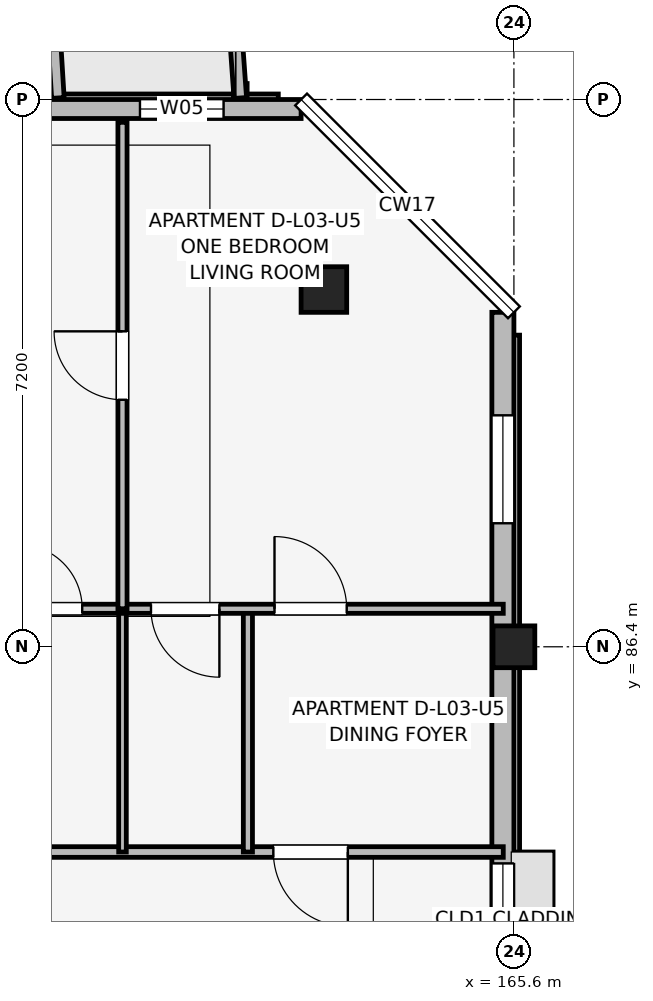
"""IFC4 building model, lengths in metres.
Left out: names, types, materials, properties, quantities, classifications, styles, units other than length and angle.
Written with IfcOpenShell. Run it as: python <this file> out.ifc"""

import sys

from ifc_helpers import new_model, si_unit, direction, frame, frame_2d, origin, origin_2d, place, context, subcontext, project, spatial, rectangle, extrude, element, fill, save


model = new_model("IFC4")
c1 = context("Model", 3, precision=1e-05, world=origin(), true_north=direction((0.0, 1.0)))
c2 = subcontext(c1, "Body", "Model", "MODEL_VIEW")
j1 = project(units=[si_unit("LENGTHUNIT", "METRE"), si_unit("PLANEANGLEUNIT", "RADIAN")], contexts=[c1])
p1 = place(None, origin())
s1 = spatial("IfcSite", under=j1, at=p1, CompositionType="ELEMENT")
p2 = place(p1, origin())
s2 = spatial("IfcBuilding", under=s1, at=p2, CompositionType="ELEMENT")
p3 = place(p2, frame((0.0, 0.0, 11.85)))
s3 = spatial("IfcBuildingStorey", under=s2, at=p3, CompositionType="ELEMENT", Elevation=11.85)
p4 = place(p3, frame((165.6, 86.4, 0.0), z_axis=(0.0, 0.0, 1.0), x_axis=(1.0, 0.0, 0.0)))
e1 = element("IfcColumn", 1, at=p4, inside=s3, PredefinedType="COLUMN", context=c2, shape_type="SweptSolid", body=[
    extrude(rectangle(XDim=0.55, YDim=0.55, at=origin_2d()), origin(), (0.0, 0.0, 1.0), 3.15),
])
p5 = place(p3, frame((163.1, 91.1, 0.0), z_axis=(0.0, 0.0, 1.0), x_axis=(1.0, 0.0, 0.0)))
e2 = element("IfcColumn", 2, at=p5, inside=s3, PredefinedType="COLUMN", context=c2, shape_type="SweptSolid", body=[
    extrude(rectangle(XDim=0.6, YDim=0.6, at=origin_2d()), origin(), (0.0, 0.0, 1.0), 3.15),
])
p6 = place(p3, frame((165.455, 74.8, 0.0), z_axis=(0.0, 0.0, 1.0), x_axis=(0.0, 1.0, 0.0)))
e3 = element("IfcWall", 3, at=p6, inside=s3, PredefinedType="SOLIDWALL", context=c2, shape_type="SweptSolid", body=[
    extrude(rectangle(XDim=16.0, YDim=0.29, at=frame_2d((8.0, 0.0))), origin(), (0.0, 0.0, 1.0), 2.38),
])
p7 = place(p6, frame((7.25, 0.0, 1.05)))
e4 = element("IfcOpeningElement", 4, at=p7, cuts=e3, PredefinedType="OPENING", context=c2, shape_type="SweptSolid", body=[
    extrude(rectangle(XDim=1.5, YDim=1.15, at=frame_2d((0.75, 0.575))), frame((0.0, 0.155, 0.0), z_axis=(0.0, -1.0, 0.0), x_axis=(1.0, 0.0, 0.0)), (0.0, 0.0, 1.0), 0.31),
])
p8 = place(p6, frame((13.225, 0.0, 0.67)))
e5 = element("IfcOpeningElement", 5, at=p8, cuts=e3, PredefinedType="OPENING", context=c2, shape_type="SweptSolid", body=[
    extrude(rectangle(XDim=1.42, YDim=1.6, at=frame_2d((0.71, 0.8))), frame((0.0, 0.155, 0.0), z_axis=(0.0, -1.0, 0.0), x_axis=(1.0, 0.0, 0.0)), (0.0, 0.0, 1.0), 0.31),
])
p9 = place(p3, frame((162.8, 93.475, 0.0), z_axis=(0.0, 0.0, 1.0), x_axis=(-1.0, 0.0, 0.0)))
e6 = element("IfcWall", 6, at=p9, inside=s3, PredefinedType="SOLIDWALL", context=c2, shape_type="SweptSolid", body=[
    extrude(rectangle(XDim=30.4, YDim=0.25, at=frame_2d((15.2, 0.0))), origin(), (0.0, 0.0, 1.0), 2.43),
])
p10 = place(p9, frame((22.1, 0.0, 0.0), z_axis=(0.0, 0.0, 1.0), x_axis=(-1.0, 0.0, 0.0)))
e7 = element("IfcOpeningElement", 7, at=p10, cuts=e6, PredefinedType="OPENING", context=c2, shape_type="SweptSolid", body=[
    extrude(rectangle(XDim=1.8, YDim=2.15, at=frame_2d((0.9, 1.075))), frame((0.0, 0.135, 0.0), z_axis=(0.0, -1.0, 0.0), x_axis=(1.0, 0.0, 0.0)), (0.0, 0.0, 1.0), 0.27),
])
p11 = place(p9, frame((7.625, 0.0, 0.0), z_axis=(0.0, 0.0, 1.0), x_axis=(-1.0, 0.0, 0.0)))
e8 = element("IfcOpeningElement", 8, at=p11, cuts=e6, PredefinedType="OPENING", context=c2, shape_type="SweptSolid", body=[
    extrude(rectangle(XDim=1.65, YDim=2.15, at=frame_2d((0.825, 1.075))), frame((0.0, 0.135, 0.0), z_axis=(0.0, -1.0, 0.0), x_axis=(1.0, 0.0, 0.0)), (0.0, 0.0, 1.0), 0.27),
])
p12 = place(p9, frame((27.97, 0.0, 0.7)))
e9 = element("IfcOpeningElement", 9, at=p12, cuts=e6, PredefinedType="OPENING", context=c2, shape_type="SweptSolid", body=[
    extrude(rectangle(XDim=1.46, YDim=1.55, at=frame_2d((0.73, 0.775))), frame((0.0, 0.135, 0.0), z_axis=(0.0, -1.0, 0.0), x_axis=(1.0, 0.0, 0.0)), (0.0, 0.0, 1.0), 0.27),
])
p13 = place(p9, frame((26.458, 0.0, 0.75)))
e10 = element("IfcOpeningElement", 10, at=p13, cuts=e6, PredefinedType="OPENING", context=c2, shape_type="SweptSolid", body=[
    extrude(rectangle(XDim=0.6, YDim=1.25, at=frame_2d((0.3, 0.625))), frame((0.0, 0.135, 0.0), z_axis=(0.0, -1.0, 0.0), x_axis=(1.0, 0.0, 0.0)), (0.0, 0.0, 1.0), 0.27),
])
p14 = place(p9, frame((24.942, 0.0, 0.75)))
e11 = element("IfcOpeningElement", 11, at=p14, cuts=e6, PredefinedType="OPENING", context=c2, shape_type="SweptSolid", body=[
    extrude(rectangle(XDim=0.6, YDim=1.25, at=frame_2d((0.3, 0.625))), frame((0.0, 0.135, 0.0), z_axis=(0.0, -1.0, 0.0), x_axis=(1.0, 0.0, 0.0)), (0.0, 0.0, 1.0), 0.27),
])
p15 = place(p9, frame((15.54, 0.0, 0.7)))
e12 = element("IfcOpeningElement", 12, at=p15, cuts=e6, PredefinedType="OPENING", context=c2, shape_type="SweptSolid", body=[
    extrude(rectangle(XDim=1.72, YDim=1.6, at=frame_2d((0.86, 0.8))), frame((0.0, 0.135, 0.0), z_axis=(0.0, -1.0, 0.0), x_axis=(1.0, 0.0, 0.0)), (0.0, 0.0, 1.0), 0.27),
])
p16 = place(p9, frame((13.465, 0.0, 0.75)))
e13 = element("IfcOpeningElement", 13, at=p16, cuts=e6, PredefinedType="OPENING", context=c2, shape_type="SweptSolid", body=[
    extrude(rectangle(XDim=0.72, YDim=1.35, at=frame_2d((0.36, 0.675))), frame((0.0, 0.135, 0.0), z_axis=(0.0, -1.0, 0.0), x_axis=(1.0, 0.0, 0.0)), (0.0, 0.0, 1.0), 0.27),
])
p17 = place(p9, frame((10.542, 0.0, 0.75)))
e14 = element("IfcOpeningElement", 14, at=p17, cuts=e6, PredefinedType="OPENING", context=c2, shape_type="SweptSolid", body=[
    extrude(rectangle(XDim=0.6, YDim=1.25, at=frame_2d((0.3, 0.625))), frame((0.0, 0.135, 0.0), z_axis=(0.0, -1.0, 0.0), x_axis=(1.0, 0.0, 0.0)), (0.0, 0.0, 1.0), 0.27),
])
p18 = place(p9, frame((3.343, 0.0, 0.75)))
e15 = element("IfcOpeningElement", 15, at=p18, cuts=e6, PredefinedType="OPENING", context=c2, shape_type="SweptSolid", body=[
    extrude(rectangle(XDim=0.6, YDim=1.25, at=frame_2d((0.3, 0.625))), frame((0.0, 0.135, 0.0), z_axis=(0.0, -1.0, 0.0), x_axis=(1.0, 0.0, 0.0)), (0.0, 0.0, 1.0), 0.27),
])
p19 = place(p9, frame((1.02, 0.0, 0.75)))
e16 = element("IfcOpeningElement", 16, at=p19, cuts=e6, PredefinedType="OPENING", context=c2, shape_type="SweptSolid", body=[
    extrude(rectangle(XDim=1.1, YDim=1.5, at=frame_2d((0.55, 0.75))), frame((0.0, 0.135, 0.0), z_axis=(0.0, -1.0, 0.0), x_axis=(1.0, 0.0, 0.0)), (0.0, 0.0, 1.0), 0.27),
])
p20 = place(p3, frame((159.6, 93.62, 0.0), z_axis=(0.0, 0.0, 1.0), x_axis=(-0.061170732449, 0.998127317276, 0.0)))
e17 = element("IfcWall", 17, at=p20, inside=s3, PredefinedType="ELEMENTEDWALL", context=c2, shape_type="SweptSolid", body=[
    extrude(rectangle(XDim=1.964, YDim=0.165, at=frame_2d((0.982, 0.0))), origin(), (0.0, 0.0, 1.0), 2.95),
])
p21 = place(p3, frame((162.0, 93.62, 0.0), z_axis=(0.0, 0.0, 1.0), x_axis=(-0.071194071069, 0.997462482625, 0.0)))
e18 = element("IfcWall", 18, at=p21, inside=s3, PredefinedType="ELEMENTEDWALL", context=c2, shape_type="SweptSolid", body=[
    extrude(rectangle(XDim=1.965, YDim=0.165, at=frame_2d((0.982, 0.0))), origin(), (0.0, 0.0, 1.0), 2.95),
])
p22 = place(p3, frame((158.54, 83.7, 0.0), z_axis=(0.0, 0.0, 1.0), x_axis=(1.0, 0.0, 0.0)))
e19 = element("IfcWall", 19, at=p22, inside=s3, PredefinedType="PARTITIONING", context=c2, shape_type="SweptSolid", body=[
    extrude(rectangle(XDim=6.92, YDim=0.14, at=frame_2d((3.46, 0.0))), origin(), (0.0, 0.0, 1.0), 2.38),
])
p23 = place(p22, frame((4.875, 0.0, 0.0), z_axis=(0.0, 0.0, 1.0), x_axis=(-1.0, 0.0, 0.0)))
e20 = element("IfcOpeningElement", 20, at=p23, cuts=e19, PredefinedType="OPENING", context=c2, shape_type="SweptSolid", body=[
    extrude(rectangle(XDim=0.98, YDim=2.1, at=frame_2d((0.49, 1.05))), frame((0.0, 0.08, 0.0), z_axis=(0.0, -1.0, 0.0), x_axis=(1.0, 0.0, 0.0)), (0.0, 0.0, 1.0), 0.16),
])
p24 = place(p3, frame((160.45, 83.7, 0.0), z_axis=(0.0, 0.0, 1.0), x_axis=(0.0, 1.0, 0.0)))
e21 = element("IfcWall", 21, at=p24, inside=s3, PredefinedType="PARTITIONING", context=c2, shape_type="SweptSolid", body=[
    extrude(rectangle(XDim=3.2, YDim=0.1, at=frame_2d((1.6, 0.0))), origin(), (0.0, 0.0, 1.0), 2.375),
])
p25 = place(p3, frame((162.1, 83.7, 0.0), z_axis=(0.0, 0.0, 1.0), x_axis=(0.0, 1.0, 0.0)))
e22 = element("IfcWall", 22, at=p25, inside=s3, PredefinedType="PARTITIONING", context=c2, shape_type="SweptSolid", body=[
    extrude(rectangle(XDim=3.2, YDim=0.12, at=frame_2d((1.6, 0.0))), origin(), (0.0, 0.0, 1.0), 2.375),
])
p26 = place(p3, frame((158.54, 86.9, 0.0), z_axis=(0.0, 0.0, 1.0), x_axis=(1.0, 0.0, 0.0)))
e23 = element("IfcWall", 23, at=p26, inside=s3, PredefinedType="PARTITIONING", context=c2, shape_type="SweptSolid", body=[
    extrude(rectangle(XDim=6.92, YDim=0.12, at=frame_2d((3.46, 0.0))), origin(), (0.0, 0.0, 1.0), 2.38),
])
p27 = place(p26, frame((0.53, 0.0, 0.0)))
e24 = element("IfcOpeningElement", 24, at=p27, cuts=e23, PredefinedType="OPENING", context=c2, shape_type="SweptSolid", body=[
    extrude(rectangle(XDim=0.85, YDim=2.08, at=frame_2d((0.425, 1.04))), frame((0.0, 0.07, 0.0), z_axis=(0.0, -1.0, 0.0), x_axis=(1.0, 0.0, 0.0)), (0.0, 0.0, 1.0), 0.14),
])
p28 = place(p26, frame((3.185, 0.0, 0.0), z_axis=(0.0, 0.0, 1.0), x_axis=(-1.0, 0.0, 0.0)))
e25 = element("IfcOpeningElement", 25, at=p28, cuts=e23, PredefinedType="OPENING", context=c2, shape_type="SweptSolid", body=[
    extrude(rectangle(XDim=0.9, YDim=2.08, at=frame_2d((0.45, 1.04))), frame((0.0, 0.07, 0.0), z_axis=(0.0, -1.0, 0.0), x_axis=(1.0, 0.0, 0.0)), (0.0, 0.0, 1.0), 0.14),
])
p29 = place(p26, frame((3.91, 0.0, 0.0)))
e26 = element("IfcOpeningElement", 26, at=p29, cuts=e23, PredefinedType="OPENING", context=c2, shape_type="SweptSolid", body=[
    extrude(rectangle(XDim=0.95, YDim=2.08, at=frame_2d((0.475, 1.04))), frame((0.0, 0.07, 0.0), z_axis=(0.0, -1.0, 0.0), x_axis=(1.0, 0.0, 0.0)), (0.0, 0.0, 1.0), 0.14),
])
p30 = place(p3, frame((160.45, 86.9, 0.0), z_axis=(0.0, 0.0, 1.0), x_axis=(0.0, 1.0, 0.0)))
e27 = element("IfcWall", 27, at=p30, inside=s3, PredefinedType="PARTITIONING", context=c2, shape_type="SweptSolid", body=[
    extrude(rectangle(XDim=6.4, YDim=0.12, at=frame_2d((3.2, 0.0))), origin(), (0.0, 0.0, 1.0), 2.38),
])
p31 = place(p30, frame((2.75, 0.0, 0.0)))
e28 = element("IfcOpeningElement", 28, at=p31, cuts=e27, PredefinedType="OPENING", context=c2, shape_type="SweptSolid", body=[
    extrude(rectangle(XDim=0.9, YDim=2.08, at=frame_2d((0.45, 1.04))), frame((0.0, 0.07, 0.0), z_axis=(0.0, -1.0, 0.0), x_axis=(1.0, 0.0, 0.0)), (0.0, 0.0, 1.0), 0.14),
])
p32 = place(p19, origin())
e29 = element("IfcWindow", 29, at=p32, inside=s3, PartitioningType="SINGLE_PANEL", PredefinedType="WINDOW", context=c2, shape_type="SweptSolid", body=[
    extrude(rectangle(XDim=1.1, YDim=1.5, at=frame_2d((0.55, 0.75))), frame((0.0, 0.03, 0.0), z_axis=(0.0, -1.0, 0.0), x_axis=(1.0, 0.0, 0.0)), (0.0, 0.0, 1.0), 0.06),
])
fill(e16, e29)
p33 = place(p7, origin())
e30 = element("IfcWindow", 30, at=p33, inside=s3, PartitioningType="SINGLE_PANEL", PredefinedType="WINDOW", context=c2, shape_type="SweptSolid", body=[
    extrude(rectangle(XDim=1.5, YDim=1.15, at=frame_2d((0.75, 0.575))), frame((0.0, 0.03, 0.0), z_axis=(0.0, -1.0, 0.0), x_axis=(1.0, 0.0, 0.0)), (0.0, 0.0, 1.0), 0.06),
])
fill(e4, e30)
p34 = place(p8, origin())
e31 = element("IfcWindow", 31, at=p34, inside=s3, PartitioningType="SINGLE_PANEL", PredefinedType="WINDOW", context=c2, shape_type="SweptSolid", body=[
    extrude(rectangle(XDim=1.42, YDim=1.6, at=frame_2d((0.71, 0.8))), frame((0.0, 0.03, 0.0), z_axis=(0.0, -1.0, 0.0), x_axis=(1.0, 0.0, 0.0)), (0.0, 0.0, 1.0), 0.06),
])
fill(e5, e31)
p35 = place(p23, origin())
e32 = element("IfcDoor", 32, at=p35, inside=s3, OperationType="SINGLE_SWING_RIGHT", PredefinedType="DOOR", context=c2, shape_type="SweptSolid", body=[
    extrude(rectangle(XDim=0.98, YDim=2.1, at=frame_2d((0.49, 1.05))), frame((0.0, 0.025, 0.0), z_axis=(0.0, -1.0, 0.0), x_axis=(1.0, 0.0, 0.0)), (0.0, 0.0, 1.0), 0.05),
])
fill(e20, e32)
p36 = place(p27, origin())
e33 = element("IfcDoor", 33, at=p36, inside=s3, OperationType="SINGLE_SWING_LEFT", PredefinedType="DOOR", context=c2, shape_type="SweptSolid", body=[
    extrude(rectangle(XDim=0.85, YDim=2.08, at=frame_2d((0.425, 1.04))), frame((0.0, 0.025, 0.0), z_axis=(0.0, -1.0, 0.0), x_axis=(1.0, 0.0, 0.0)), (0.0, 0.0, 1.0), 0.05),
])
fill(e24, e33)
p37 = place(p28, origin())
e34 = element("IfcDoor", 34, at=p37, inside=s3, OperationType="SINGLE_SWING_RIGHT", PredefinedType="DOOR", context=c2, shape_type="SweptSolid", body=[
    extrude(rectangle(XDim=0.9, YDim=2.08, at=frame_2d((0.45, 1.04))), frame((0.0, 0.025, 0.0), z_axis=(0.0, -1.0, 0.0), x_axis=(1.0, 0.0, 0.0)), (0.0, 0.0, 1.0), 0.05),
])
fill(e25, e34)
p38 = place(p29, origin())
e35 = element("IfcDoor", 35, at=p38, inside=s3, OperationType="SINGLE_SWING_LEFT", PredefinedType="DOOR", context=c2, shape_type="SweptSolid", body=[
    extrude(rectangle(XDim=0.95, YDim=2.08, at=frame_2d((0.475, 1.04))), frame((0.0, 0.025, 0.0), z_axis=(0.0, -1.0, 0.0), x_axis=(1.0, 0.0, 0.0)), (0.0, 0.0, 1.0), 0.05),
])
fill(e26, e35)
p39 = place(p31, origin())
e36 = element("IfcDoor", 36, at=p39, inside=s3, OperationType="SINGLE_SWING_RIGHT", PredefinedType="DOOR", context=c2, shape_type="SweptSolid", body=[
    extrude(rectangle(XDim=0.9, YDim=2.08, at=frame_2d((0.45, 1.04))), frame((0.0, 0.025, 0.0), z_axis=(0.0, -1.0, 0.0), x_axis=(1.0, 0.0, 0.0)), (0.0, 0.0, 1.0), 0.05),
])
fill(e28, e36)
save(model, sys.argv[1])
